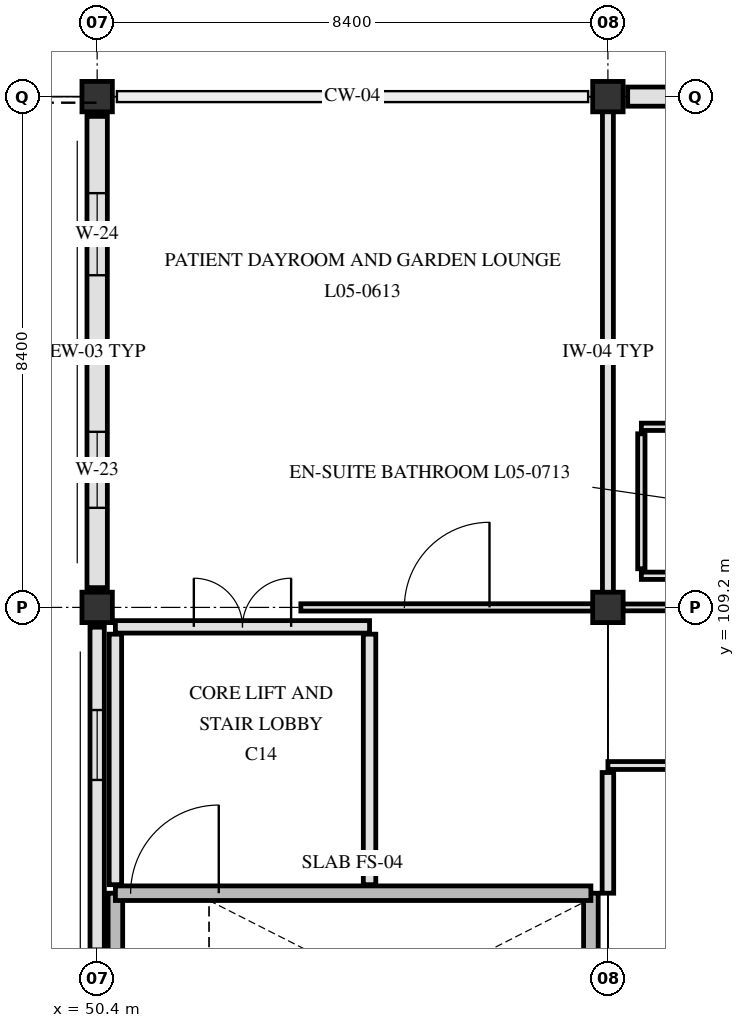
"""IFC4 building model, lengths in metres.
Left out: names, types, materials, properties, quantities, classifications, styles, units other than length and angle.
Written with IfcOpenShell. Run it as: python <this file> out.ifc"""

import sys

from ifc_helpers import new_model, si_unit, direction, frame, frame_2d, origin, origin_2d, place, context, subcontext, project, spatial, rectangle, extrude, element, fill, save


model = new_model("IFC4")
c1 = context("Model", 3, precision=1e-05, world=origin(), true_north=direction((0.0, 1.0)))
c2 = subcontext(c1, "Body", "Model", "MODEL_VIEW")
j1 = project(units=[si_unit("LENGTHUNIT", "METRE"), si_unit("PLANEANGLEUNIT", "RADIAN")], contexts=[c1])
p1 = place(None, origin())
s1 = spatial("IfcSite", under=j1, at=p1, CompositionType="ELEMENT")
p2 = place(p1, origin())
s2 = spatial("IfcBuilding", under=s1, at=p2, CompositionType="ELEMENT")
p3 = place(p2, frame((0.0, 0.0, 22.5)))
s3 = spatial("IfcBuildingStorey", under=s2, at=p3, CompositionType="ELEMENT", Elevation=22.5)
for number, where, z_axis, x_axis in (
    (1, (50.4, 109.2, 0.0), (0.0, 0.0, 1.0), (1.0, 0.0, 0.0)),
    (2, (50.4, 117.6, 0.0), (0.0, 0.0, 1.0), (1.0, 0.0, 0.0)),
    (3, (58.8, 109.2, 0.0), (0.0, 0.0, 1.0), (1.0, 0.0, 0.0)),
    (4, (58.8, 117.6, 0.0), (0.0, 0.0, 1.0), (1.0, 0.0, 0.0)),
):
    element("IfcColumn", number, at=place(p3, frame(where, z_axis=z_axis, x_axis=x_axis)), inside=s3, PredefinedType="COLUMN", context=c2, shape_type="SweptSolid", body=[
        extrude(rectangle(XDim=0.5, YDim=0.5, at=origin_2d()), origin(), (0.0, 0.0, 1.0), 3.9),
    ])
p4 = place(p3, frame((50.4, 101.125, 0.0), z_axis=(0.0, 0.0, 1.0), x_axis=(0.0, 1.0, 0.0)))
e5 = element("IfcWall", 5, at=p4, inside=s3, PredefinedType="SOLIDWALL", context=c2, shape_type="SweptSolid", body=[
    extrude(rectangle(XDim=7.75, YDim=0.235, at=frame_2d((3.875, 0.0))), origin(), (0.0, 0.0, 1.0), 3.37),
])
p5 = place(p4, frame((1.413, 0.0, 0.85)))
e6 = element("IfcOpeningElement", 6, at=p5, cuts=e5, PredefinedType="OPENING", context=c2, shape_type="SweptSolid", body=[
    extrude(rectangle(XDim=1.05, YDim=1.54, at=frame_2d((0.525, 0.77))), frame((0.0, 0.127, 0.0), z_axis=(0.0, -1.0, 0.0), x_axis=(1.0, 0.0, 0.0)), (0.0, 0.0, 1.0), 0.255),
])
p6 = place(p4, frame((5.238, 0.0, 0.85)))
e7 = element("IfcOpeningElement", 7, at=p6, cuts=e5, PredefinedType="OPENING", context=c2, shape_type="SweptSolid", body=[
    extrude(rectangle(XDim=1.15, YDim=1.54, at=frame_2d((0.575, 0.77))), frame((0.0, 0.127, 0.0), z_axis=(0.0, -1.0, 0.0), x_axis=(1.0, 0.0, 0.0)), (0.0, 0.0, 1.0), 0.255),
])
p7 = place(p3, frame((50.4, 109.525, 0.0), z_axis=(0.0, 0.0, 1.0), x_axis=(0.0, 1.0, 0.0)))
e8 = element("IfcWall", 8, at=p7, inside=s3, PredefinedType="SOLIDWALL", context=c2, shape_type="SweptSolid", body=[
    extrude(rectangle(XDim=7.75, YDim=0.335, at=frame_2d((3.875, 0.0))), origin(), (0.0, 0.0, 1.0), 3.33),
])
p8 = place(p7, frame((1.312, 0.0, 0.85)))
e9 = element("IfcOpeningElement", 9, at=p8, cuts=e8, PredefinedType="OPENING", context=c2, shape_type="SweptSolid", body=[
    extrude(rectangle(XDim=1.25, YDim=1.54, at=frame_2d((0.625, 0.77))), frame((0.0, 0.177, 0.0), z_axis=(0.0, -1.0, 0.0), x_axis=(1.0, 0.0, 0.0)), (0.0, 0.0, 1.0), 0.355),
])
p9 = place(p7, frame((5.137, 0.0, 0.85)))
e10 = element("IfcOpeningElement", 10, at=p9, cuts=e8, PredefinedType="OPENING", context=c2, shape_type="SweptSolid", body=[
    extrude(rectangle(XDim=1.35, YDim=1.54, at=frame_2d((0.675, 0.77))), frame((0.0, 0.177, 0.0), z_axis=(0.0, -1.0, 0.0), x_axis=(1.0, 0.0, 0.0)), (0.0, 0.0, 1.0), 0.355),
])
p10 = place(p3, frame((59.125, 117.6, 0.0), z_axis=(0.0, 0.0, 1.0), x_axis=(1.0, 0.0, 0.0)))
e11 = element("IfcWall", 11, at=p10, inside=s3, PredefinedType="SOLIDWALL", context=c2, shape_type="SweptSolid", body=[
    extrude(rectangle(XDim=7.7, YDim=0.315, at=frame_2d((3.85, 0.0))), origin(), (0.0, 0.0, 1.0), 3.3),
])
p11 = place(p10, frame((1.2, 0.0, 0.85)))
e12 = element("IfcOpeningElement", 12, at=p11, cuts=e11, PredefinedType="OPENING", context=c2, shape_type="SweptSolid", body=[
    extrude(rectangle(XDim=1.45, YDim=1.54, at=frame_2d((0.725, 0.77))), frame((0.0, 0.167, 0.0), z_axis=(0.0, -1.0, 0.0), x_axis=(1.0, 0.0, 0.0)), (0.0, 0.0, 1.0), 0.335),
])
p12 = place(p10, frame((5.0, 0.0, 0.85)))
e13 = element("IfcOpeningElement", 13, at=p12, cuts=e11, PredefinedType="OPENING", context=c2, shape_type="SweptSolid", body=[
    extrude(rectangle(XDim=1.55, YDim=1.54, at=frame_2d((0.775, 0.77))), frame((0.0, 0.167, 0.0), z_axis=(0.0, -1.0, 0.0), x_axis=(1.0, 0.0, 0.0)), (0.0, 0.0, 1.0), 0.335),
])
for number, where, z_axis, x_axis in (
    (14, (50.7, 101.18, 0.0), (0.0, 0.0, 1.0), (0.0, 1.0, 0.0)),
    (15, (58.52, 101.18, 0.0), (0.0, 0.0, 1.0), (0.0, 1.0, 0.0)),
):
    element("IfcWall", number, at=place(p3, frame(where, z_axis=z_axis, x_axis=x_axis)), inside=s3, PredefinedType="SHEAR", context=c2, shape_type="SweptSolid", body=[
        extrude(rectangle(XDim=3.32, YDim=0.24, at=frame_2d((1.66, 0.0))), origin(), (0.0, 0.0, 1.0), 3.62),
    ])
p13 = place(p3, frame((50.7, 104.5, 0.0), z_axis=(0.0, 0.0, 1.0), x_axis=(1.0, 0.0, 0.0)))
e16 = element("IfcWall", 16, at=p13, inside=s3, PredefinedType="SHEAR", context=c2, shape_type="SweptSolid", body=[
    extrude(rectangle(XDim=7.82, YDim=0.24, at=frame_2d((3.91, 0.0))), origin(), (0.0, 0.0, 1.0), 3.62),
])
p14 = place(p13, frame((0.25, 0.0, 0.0)))
e17 = element("IfcOpeningElement", 17, at=p14, cuts=e16, PredefinedType="OPENING", context=c2, shape_type="SweptSolid", body=[
    extrude(rectangle(XDim=1.45, YDim=2.2, at=frame_2d((0.725, 1.1))), frame((0.0, 0.13, 0.0), z_axis=(0.0, -1.0, 0.0), x_axis=(1.0, 0.0, 0.0)), (0.0, 0.0, 1.0), 0.26),
])
for number, where, z_axis, x_axis in (
    (18, (54.88, 104.64, 0.0), (0.0, 0.0, 1.0), (0.0, 1.0, 0.0)),
    (19, (50.7, 104.64, 0.0), (0.0, 0.0, 1.0), (0.0, 1.0, 0.0)),
):
    element("IfcWall", number, at=place(p3, frame(where, z_axis=z_axis, x_axis=x_axis)), inside=s3, PredefinedType="PARTITIONING", context=c2, shape_type="SweptSolid", body=[
        extrude(rectangle(XDim=4.12, YDim=0.205, at=frame_2d((2.06, 0.0))), origin(), (0.0, 0.0, 1.0), 3.61),
    ])
p15 = place(p3, frame((50.7, 108.88, 0.0), z_axis=(0.0, 0.0, 1.0), x_axis=(1.0, 0.0, 0.0)))
e20 = element("IfcWall", 20, at=p15, inside=s3, PredefinedType="PARTITIONING", context=c2, shape_type="SweptSolid", body=[
    extrude(rectangle(XDim=4.18, YDim=0.205, at=frame_2d((2.09, 0.0))), origin(), (0.0, 0.0, 1.0), 3.61),
])
p16 = place(p15, frame((1.29, 0.0, 0.0)))
e21 = element("IfcOpeningElement", 21, at=p16, cuts=e20, PredefinedType="OPENING", context=c2, shape_type="SweptSolid", body=[
    extrude(rectangle(XDim=1.6, YDim=2.25, at=frame_2d((0.8, 1.125))), frame((0.0, 0.113, 0.0), z_axis=(0.0, -1.0, 0.0), x_axis=(1.0, 0.0, 0.0)), (0.0, 0.0, 1.0), 0.225),
])
p17 = place(p3, frame((58.8, 106.6, 0.0), z_axis=(0.0, 0.0, 1.0), x_axis=(1.0, 0.0, 0.0)))
e22 = element("IfcWall", 22, at=p17, inside=s3, PredefinedType="PARTITIONING", context=c2, shape_type="SweptSolid", body=[
    extrude(rectangle(XDim=8.4, YDim=0.13, at=frame_2d((4.2, 0.0))), origin(), (0.0, 0.0, 1.0), 3.29),
])
p18 = place(p17, frame((3.4, 0.0, 0.0)))
e23 = element("IfcOpeningElement", 23, at=p18, cuts=e22, PredefinedType="OPENING", context=c2, shape_type="SweptSolid", body=[
    extrude(rectangle(XDim=1.6, YDim=2.25, at=frame_2d((0.8, 1.125))), frame((0.0, 0.075, 0.0), z_axis=(0.0, -1.0, 0.0), x_axis=(1.0, 0.0, 0.0)), (0.0, 0.0, 1.0), 0.15),
])
p19 = place(p3, frame((53.75, 109.2, 0.0), z_axis=(0.0, 0.0, 1.0), x_axis=(1.0, 0.0, 0.0)))
e24 = element("IfcWall", 24, at=p19, inside=s3, PredefinedType="PARTITIONING", context=c2, shape_type="SweptSolid", body=[
    extrude(rectangle(XDim=4.805, YDim=0.12, at=frame_2d((2.402, 0.0))), origin(), (0.0, 0.0, 1.0), 3.15),
])
p20 = place(p19, frame((1.702, 0.0, 0.0)))
e25 = element("IfcOpeningElement", 25, at=p20, cuts=e24, PredefinedType="OPENING", context=c2, shape_type="SweptSolid", body=[
    extrude(rectangle(XDim=1.4, YDim=2.2, at=frame_2d((0.7, 1.1))), frame((0.0, 0.07, 0.0), z_axis=(0.0, -1.0, 0.0), x_axis=(1.0, 0.0, 0.0)), (0.0, 0.0, 1.0), 0.14),
])
p21 = place(p3, frame((59.045, 109.2, 0.0), z_axis=(0.0, 0.0, 1.0), x_axis=(1.0, 0.0, 0.0)))
e26 = element("IfcWall", 26, at=p21, inside=s3, PredefinedType="PARTITIONING", context=c2, shape_type="SweptSolid", body=[
    extrude(rectangle(XDim=7.86, YDim=0.112, at=frame_2d((3.93, 0.0))), origin(), (0.0, 0.0, 1.0), 3.15),
])
p22 = place(p21, frame((4.173, 0.0, 0.0)))
e27 = element("IfcOpeningElement", 27, at=p22, cuts=e26, PredefinedType="OPENING", context=c2, shape_type="SweptSolid", body=[
    extrude(rectangle(XDim=1.8, YDim=2.25, at=frame_2d((0.9, 1.125))), frame((0.0, 0.066, 0.0), z_axis=(0.0, -1.0, 0.0), x_axis=(1.0, 0.0, 0.0)), (0.0, 0.0, 1.0), 0.132),
])
p23 = place(p3, frame((59.35, 109.72, 0.0), z_axis=(0.0, 0.0, 1.0), x_axis=(1.0, 0.0, 0.0)))
e28 = element("IfcWall", 28, at=p23, inside=s3, PredefinedType="PARTITIONING", context=c2, shape_type="SweptSolid", body=[
    extrude(rectangle(XDim=3.05, YDim=0.12, at=frame_2d((1.525, 0.0))), origin(), (0.0, 0.0, 1.0), 3.61),
])
p24 = place(p3, frame((59.35, 112.17, 0.0), z_axis=(0.0, 0.0, 1.0), x_axis=(1.0, 0.0, 0.0)))
e29 = element("IfcWall", 29, at=p24, inside=s3, PredefinedType="PARTITIONING", context=c2, shape_type="SweptSolid", body=[
    extrude(rectangle(XDim=3.05, YDim=0.12, at=frame_2d((1.525, 0.0))), origin(), (0.0, 0.0, 1.0), 3.61),
])
p25 = place(p24, frame((1.05, 0.0, 0.0)))
e30 = element("IfcOpeningElement", 30, at=p25, cuts=e29, PredefinedType="OPENING", context=c2, shape_type="SweptSolid", body=[
    extrude(rectangle(XDim=0.95, YDim=2.1, at=frame_2d((0.475, 1.05))), frame((0.0, 0.07, 0.0), z_axis=(0.0, -1.0, 0.0), x_axis=(1.0, 0.0, 0.0)), (0.0, 0.0, 1.0), 0.14),
])
p26 = place(p3, frame((58.8, 104.5, 0.0), z_axis=(0.0, 0.0, 1.0), x_axis=(0.0, 1.0, 0.0)))
e31 = element("IfcWall", 31, at=p26, inside=s3, PredefinedType="PARTITIONING", context=c2, shape_type="SweptSolid", body=[
    extrude(rectangle(XDim=1.985, YDim=0.19, at=frame_2d((0.993, 0.0))), origin(), (0.0, 0.0, 1.0), 3.29),
])
p27 = place(p3, frame((58.8, 109.445, 0.0), z_axis=(0.0, 0.0, 1.0), x_axis=(0.0, 1.0, 0.0)))
e32 = element("IfcWall", 32, at=p27, inside=s3, PredefinedType="PARTITIONING", context=c2, shape_type="SweptSolid", body=[
    extrude(rectangle(XDim=7.91, YDim=0.18, at=frame_2d((3.955, 0.0))), origin(), (0.0, 0.0, 1.0), 3.29),
])
p28 = place(p3, frame((59.35, 109.835, 0.0), z_axis=(0.0, 0.0, 1.0), x_axis=(0.0, 1.0, 0.0)))
e33 = element("IfcWall", 33, at=p28, inside=s3, PredefinedType="PARTITIONING", context=c2, shape_type="SweptSolid", body=[
    extrude(rectangle(XDim=2.22, YDim=0.12, at=frame_2d((1.11, 0.0))), origin(), (0.0, 0.0, 1.0), 3.33),
])
p29 = place(p6, origin())
e34 = element("IfcWindow", 34, at=p29, inside=s3, PartitioningType="SINGLE_PANEL", PredefinedType="WINDOW", context=c2, shape_type="SweptSolid", body=[
    extrude(rectangle(XDim=1.15, YDim=1.54, at=frame_2d((0.575, 0.77))), frame((0.0, 0.03, 0.0), z_axis=(0.0, -1.0, 0.0), x_axis=(1.0, 0.0, 0.0)), (0.0, 0.0, 1.0), 0.06),
])
fill(e7, e34)
p30 = place(p8, origin())
e35 = element("IfcWindow", 35, at=p30, inside=s3, PartitioningType="SINGLE_PANEL", PredefinedType="WINDOW", context=c2, shape_type="SweptSolid", body=[
    extrude(rectangle(XDim=1.25, YDim=1.54, at=frame_2d((0.625, 0.77))), frame((0.0, 0.03, 0.0), z_axis=(0.0, -1.0, 0.0), x_axis=(1.0, 0.0, 0.0)), (0.0, 0.0, 1.0), 0.06),
])
fill(e9, e35)
p31 = place(p9, origin())
e36 = element("IfcWindow", 36, at=p31, inside=s3, PartitioningType="SINGLE_PANEL", PredefinedType="WINDOW", context=c2, shape_type="SweptSolid", body=[
    extrude(rectangle(XDim=1.35, YDim=1.54, at=frame_2d((0.675, 0.77))), frame((0.0, 0.03, 0.0), z_axis=(0.0, -1.0, 0.0), x_axis=(1.0, 0.0, 0.0)), (0.0, 0.0, 1.0), 0.06),
])
fill(e10, e36)
p32 = place(p14, origin())
e37 = element("IfcDoor", 37, at=p32, inside=s3, OperationType="SINGLE_SWING_RIGHT", PredefinedType="DOOR", context=c2, shape_type="SweptSolid", body=[
    extrude(rectangle(XDim=1.45, YDim=2.2, at=frame_2d((0.725, 1.1))), frame((0.0, 0.025, 0.0), z_axis=(0.0, -1.0, 0.0), x_axis=(1.0, 0.0, 0.0)), (0.0, 0.0, 1.0), 0.05),
])
fill(e17, e37)
p33 = place(p16, origin())
e38 = element("IfcDoor", 38, at=p33, inside=s3, OperationType="DOUBLE_SWING_LEFT", PredefinedType="DOOR", context=c2, shape_type="SweptSolid", body=[
    extrude(rectangle(XDim=1.6, YDim=2.25, at=frame_2d((0.8, 1.125))), frame((0.0, 0.025, 0.0), z_axis=(0.0, -1.0, 0.0), x_axis=(1.0, 0.0, 0.0)), (0.0, 0.0, 1.0), 0.05),
])
fill(e21, e38)
p34 = place(p20, origin())
e39 = element("IfcDoor", 39, at=p34, inside=s3, OperationType="SINGLE_SWING_RIGHT", PredefinedType="DOOR", context=c2, shape_type="SweptSolid", body=[
    extrude(rectangle(XDim=1.4, YDim=2.2, at=frame_2d((0.7, 1.1))), frame((0.0, 0.025, 0.0), z_axis=(0.0, -1.0, 0.0), x_axis=(1.0, 0.0, 0.0)), (0.0, 0.0, 1.0), 0.05),
])
fill(e25, e39)
save(model, sys.argv[1])
